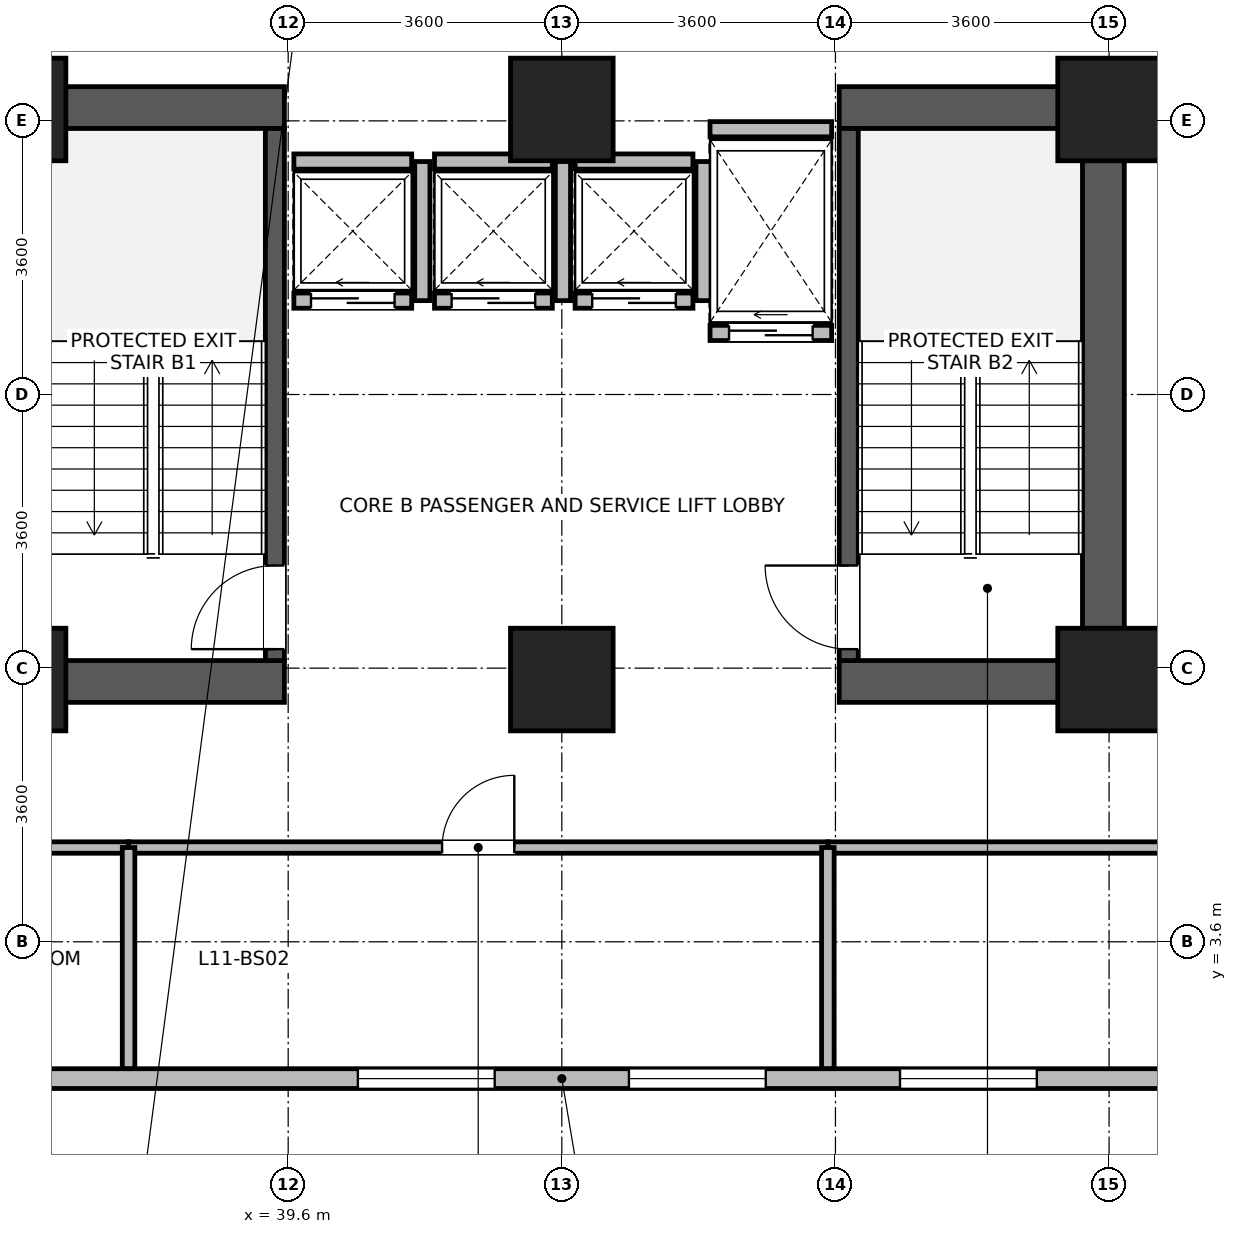
"""IFC4 building model, lengths in metres.
Left out: names, types, materials, properties, quantities, classifications, styles, units other than length and angle.
Written with IfcOpenShell. Run it as: python <this file> out.ifc"""

import sys

from ifc_helpers import new_model, si_unit, direction, frame, frame_2d, origin, origin_2d, place, context, subcontext, project, spatial, rectangle, extrude, source, transform, mapped, element, fill, save


model = new_model("IFC4")
c1 = context("Model", 3, precision=1e-05, world=origin(), true_north=direction((0.0, 1.0)))
c2 = subcontext(c1, "Body", "Model", "MODEL_VIEW")
j1 = project(units=[si_unit("LENGTHUNIT", "METRE"), si_unit("PLANEANGLEUNIT", "RADIAN")], contexts=[c1])
p1 = place(None, origin())
s1 = spatial("IfcSite", under=j1, at=p1, CompositionType="ELEMENT")
p2 = place(p1, origin())
s2 = spatial("IfcBuilding", under=s1, at=p2, CompositionType="ELEMENT")
p3 = place(p2, frame((0.0, 0.0, 47.5)))
s3 = spatial("IfcBuildingStorey", under=s2, at=p3, CompositionType="ELEMENT", Elevation=47.5)
p4 = place(p3, frame((50.325, 6.75, 0.0), z_axis=(0.0, 0.0, 1.0), x_axis=(0.0, 1.0, 0.0)))
e1 = element("IfcWall", 1, at=p4, inside=s3, PredefinedType="SHEAR", context=c2, shape_type="SweptSolid", body=[
    extrude(rectangle(XDim=8.1, YDim=0.55, at=frame_2d((4.05, 0.0))), origin(), (0.0, 0.0, 1.0), 3.45),
])
for number, where, z_axis, x_axis in (
    (2, (36.35, 7.025, 0.0), (0.0, 0.0, 1.0), (1.0, 0.0, 0.0)),
    (3, (46.85, 7.025, 0.0), (0.0, 0.0, 1.0), (1.0, 0.0, 0.0)),
    (4, (36.35, 14.575, 0.0), (0.0, 0.0, 1.0), (1.0, 0.0, 0.0)),
    (5, (46.85, 14.575, 0.0), (0.0, 0.0, 1.0), (1.0, 0.0, 0.0)),
):
    element("IfcWall", number, at=place(p3, frame(where, z_axis=z_axis, x_axis=x_axis)), inside=s3, PredefinedType="SHEAR", context=c2, shape_type="SweptSolid", body=[
        extrude(rectangle(XDim=3.2, YDim=0.55, at=frame_2d((1.6, 0.0))), origin(), (0.0, 0.0, 1.0), 3.45),
    ])
p5 = place(p3, frame((39.425, 7.3, 0.0), z_axis=(0.0, 0.0, 1.0), x_axis=(0.0, 1.0, 0.0)))
e6 = element("IfcWall", 6, at=p5, inside=s3, PredefinedType="SHEAR", context=c2, shape_type="SweptSolid", body=[
    extrude(rectangle(XDim=7.0, YDim=0.25, at=frame_2d((3.5, 0.0))), origin(), (0.0, 0.0, 1.0), 3.45),
])
p6 = place(p5, frame((0.15, 0.0, 0.0)))
e7 = element("IfcOpeningElement", 7, at=p6, cuts=e6, PredefinedType="OPENING", context=c2, shape_type="SweptSolid", body=[
    extrude(rectangle(XDim=1.1, YDim=2.08, at=frame_2d((0.55, 1.04))), frame((0.0, 0.135, 0.0), z_axis=(0.0, -1.0, 0.0), x_axis=(1.0, 0.0, 0.0)), (0.0, 0.0, 1.0), 0.27),
])
p7 = place(p3, frame((46.975, 7.3, 0.0), z_axis=(0.0, 0.0, 1.0), x_axis=(0.0, 1.0, 0.0)))
e8 = element("IfcWall", 8, at=p7, inside=s3, PredefinedType="SHEAR", context=c2, shape_type="SweptSolid", body=[
    extrude(rectangle(XDim=7.0, YDim=0.25, at=frame_2d((3.5, 0.0))), origin(), (0.0, 0.0, 1.0), 3.45),
])
p8 = place(p7, frame((0.15, 0.0, 0.0)))
e9 = element("IfcOpeningElement", 9, at=p8, cuts=e8, PredefinedType="OPENING", context=c2, shape_type="SweptSolid", body=[
    extrude(rectangle(XDim=1.1, YDim=2.08, at=frame_2d((0.55, 1.04))), frame((0.0, 0.135, 0.0), z_axis=(0.0, -1.0, 0.0), x_axis=(1.0, 0.0, 0.0)), (0.0, 0.0, 1.0), 0.27),
])
m1 = source(origin(), c2, "Body", "SweptSolid", [
    extrude(rectangle(XDim=1.35, YDim=1.35, at=origin_2d()), origin(), (0.0, 0.0, 1.0), 3.7),
])
for number, where, z_axis, x_axis in (
    (10, (36.0, 7.05, 0.0), (0.0, 0.0, 1.0), (1.0, 0.0, 0.0)),
    (11, (36.0, 14.55, 0.0), (0.0, 0.0, 1.0), (1.0, 0.0, 0.0)),
    (12, (43.2, 7.05, 0.0), (0.0, 0.0, 1.0), (1.0, 0.0, 0.0)),
    (13, (43.2, 14.55, 0.0), (0.0, 0.0, 1.0), (1.0, 0.0, 0.0)),
    (14, (50.4, 7.05, 0.0), (0.0, 0.0, 1.0), (1.0, 0.0, 0.0)),
    (15, (50.4, 14.55, 0.0), (0.0, 0.0, 1.0), (1.0, 0.0, 0.0)),
):
    element("IfcColumn", number, at=place(p3, frame(where, z_axis=z_axis, x_axis=x_axis)), inside=s3, PredefinedType="COLUMN", context=c2, shape_type="MappedRepresentation", body=[
        mapped(m1, transform((0.0, 0.0, 0.0), x_axis=(1.0, 0.0, 0.0), y_axis=(0.0, 1.0, 0.0), z_axis=(0.0, 0.0, 1.0), scale=1.0)),
    ])
p9 = place(p3, frame((57.465, 1.8, 0.0), z_axis=(0.0, 0.0, 1.0), x_axis=(-1.0, 0.0, 0.0)))
e16 = element("IfcWall", 16, at=p9, inside=s3, PredefinedType="STANDARD", context=c2, shape_type="SweptSolid", body=[
    extrude(rectangle(XDim=28.53, YDim=0.26, at=frame_2d((14.265, 0.0))), origin(), (0.0, 0.0, 1.0), 3.43),
])
p10 = place(p9, frame((0.883, 0.0, 0.85)))
e17 = element("IfcOpeningElement", 17, at=p10, cuts=e16, PredefinedType="OPENING", context=c2, shape_type="SweptSolid", body=[
    extrude(rectangle(XDim=1.8, YDim=1.85, at=frame_2d((0.9, 0.925))), frame((0.0, 0.14, 0.0), z_axis=(0.0, -1.0, 0.0), x_axis=(1.0, 0.0, 0.0)), (0.0, 0.0, 1.0), 0.28),
])
p11 = place(p9, frame((4.449, 0.0, 0.85)))
e18 = element("IfcOpeningElement", 18, at=p11, cuts=e16, PredefinedType="OPENING", context=c2, shape_type="SweptSolid", body=[
    extrude(rectangle(XDim=1.8, YDim=1.85, at=frame_2d((0.9, 0.925))), frame((0.0, 0.14, 0.0), z_axis=(0.0, -1.0, 0.0), x_axis=(1.0, 0.0, 0.0)), (0.0, 0.0, 1.0), 0.28),
])
p12 = place(p9, frame((8.016, 0.0, 0.85)))
e19 = element("IfcOpeningElement", 19, at=p12, cuts=e16, PredefinedType="OPENING", context=c2, shape_type="SweptSolid", body=[
    extrude(rectangle(XDim=1.8, YDim=1.85, at=frame_2d((0.9, 0.925))), frame((0.0, 0.14, 0.0), z_axis=(0.0, -1.0, 0.0), x_axis=(1.0, 0.0, 0.0)), (0.0, 0.0, 1.0), 0.28),
])
p13 = place(p9, frame((11.582, 0.0, 0.85)))
e20 = element("IfcOpeningElement", 20, at=p13, cuts=e16, PredefinedType="OPENING", context=c2, shape_type="SweptSolid", body=[
    extrude(rectangle(XDim=1.8, YDim=1.85, at=frame_2d((0.9, 0.925))), frame((0.0, 0.14, 0.0), z_axis=(0.0, -1.0, 0.0), x_axis=(1.0, 0.0, 0.0)), (0.0, 0.0, 1.0), 0.28),
])
p14 = place(p9, frame((15.148, 0.0, 0.85)))
e21 = element("IfcOpeningElement", 21, at=p14, cuts=e16, PredefinedType="OPENING", context=c2, shape_type="SweptSolid", body=[
    extrude(rectangle(XDim=1.8, YDim=1.85, at=frame_2d((0.9, 0.925))), frame((0.0, 0.14, 0.0), z_axis=(0.0, -1.0, 0.0), x_axis=(1.0, 0.0, 0.0)), (0.0, 0.0, 1.0), 0.28),
])
p15 = place(p9, frame((22.281, 0.0, 0.85)))
e22 = element("IfcOpeningElement", 22, at=p15, cuts=e16, PredefinedType="OPENING", context=c2, shape_type="SweptSolid", body=[
    extrude(rectangle(XDim=1.8, YDim=1.85, at=frame_2d((0.9, 0.925))), frame((0.0, 0.14, 0.0), z_axis=(0.0, -1.0, 0.0), x_axis=(1.0, 0.0, 0.0)), (0.0, 0.0, 1.0), 0.28),
])
p16 = place(p9, frame((25.847, 0.0, 0.85)))
e23 = element("IfcOpeningElement", 23, at=p16, cuts=e16, PredefinedType="OPENING", context=c2, shape_type="SweptSolid", body=[
    extrude(rectangle(XDim=1.8, YDim=1.85, at=frame_2d((0.9, 0.925))), frame((0.0, 0.14, 0.0), z_axis=(0.0, -1.0, 0.0), x_axis=(1.0, 0.0, 0.0)), (0.0, 0.0, 1.0), 0.28),
])
p17 = place(p3, frame((39.675, 12.035, 0.0), z_axis=(0.0, 0.0, 1.0), x_axis=(1.0, 0.0, 0.0)))
e24 = element("IfcWall", 24, at=p17, inside=s3, PredefinedType="PARTITIONING", context=c2, shape_type="SweptSolid", body=[
    extrude(rectangle(XDim=1.55, YDim=0.2, at=frame_2d((0.775, 0.0))), origin(), (0.0, 0.0, 1.0), 3.43),
])
p18 = place(p17, frame((0.225, 0.0, 0.0)))
e25 = element("IfcOpeningElement", 25, at=p18, cuts=e24, PredefinedType="OPENING", context=c2, shape_type="SweptSolid", body=[
    extrude(rectangle(XDim=1.1, YDim=2.12, at=frame_2d((0.55, 1.06))), frame((0.0, 0.11, 0.0), z_axis=(0.0, -1.0, 0.0), x_axis=(1.0, 0.0, 0.0)), (0.0, 0.0, 1.0), 0.22),
])
p19 = place(p3, frame((39.675, 13.865, 0.0), z_axis=(0.0, 0.0, 1.0), x_axis=(1.0, 0.0, 0.0)))
e26 = element("IfcWall", 26, at=p19, inside=s3, PredefinedType="PARTITIONING", context=c2, shape_type="SweptSolid", body=[
    extrude(rectangle(XDim=1.55, YDim=0.2, at=frame_2d((0.775, 0.0))), origin(), (0.0, 0.0, 1.0), 3.43),
])
p20 = place(p3, frame((41.365, 12.035, 0.0), z_axis=(0.0, 0.0, 1.0), x_axis=(0.0, 1.0, 0.0)))
e27 = element("IfcWall", 27, at=p20, inside=s3, PredefinedType="PARTITIONING", context=c2, shape_type="SweptSolid", body=[
    extrude(rectangle(XDim=1.83, YDim=0.2, at=frame_2d((0.915, 0.0))), origin(), (0.0, 0.0, 1.0), 3.43),
])
p21 = place(p3, frame((41.525, 12.035, 0.0), z_axis=(0.0, 0.0, 1.0), x_axis=(1.0, 0.0, 0.0)))
e28 = element("IfcWall", 28, at=p21, inside=s3, PredefinedType="PARTITIONING", context=c2, shape_type="SweptSolid", body=[
    extrude(rectangle(XDim=1.55, YDim=0.2, at=frame_2d((0.775, 0.0))), origin(), (0.0, 0.0, 1.0), 3.43),
])
p22 = place(p21, frame((0.225, 0.0, 0.0)))
e29 = element("IfcOpeningElement", 29, at=p22, cuts=e28, PredefinedType="OPENING", context=c2, shape_type="SweptSolid", body=[
    extrude(rectangle(XDim=1.1, YDim=2.12, at=frame_2d((0.55, 1.06))), frame((0.0, 0.11, 0.0), z_axis=(0.0, -1.0, 0.0), x_axis=(1.0, 0.0, 0.0)), (0.0, 0.0, 1.0), 0.22),
])
p23 = place(p3, frame((41.525, 13.865, 0.0), z_axis=(0.0, 0.0, 1.0), x_axis=(1.0, 0.0, 0.0)))
e30 = element("IfcWall", 30, at=p23, inside=s3, PredefinedType="PARTITIONING", context=c2, shape_type="SweptSolid", body=[
    extrude(rectangle(XDim=1.55, YDim=0.2, at=frame_2d((0.775, 0.0))), origin(), (0.0, 0.0, 1.0), 3.43),
])
p24 = place(p3, frame((43.215, 12.035, 0.0), z_axis=(0.0, 0.0, 1.0), x_axis=(0.0, 1.0, 0.0)))
e31 = element("IfcWall", 31, at=p24, inside=s3, PredefinedType="PARTITIONING", context=c2, shape_type="SweptSolid", body=[
    extrude(rectangle(XDim=1.83, YDim=0.2, at=frame_2d((0.915, 0.0))), origin(), (0.0, 0.0, 1.0), 3.43),
])
p25 = place(p3, frame((43.375, 12.035, 0.0), z_axis=(0.0, 0.0, 1.0), x_axis=(1.0, 0.0, 0.0)))
e32 = element("IfcWall", 32, at=p25, inside=s3, PredefinedType="PARTITIONING", context=c2, shape_type="SweptSolid", body=[
    extrude(rectangle(XDim=1.55, YDim=0.2, at=frame_2d((0.775, 0.0))), origin(), (0.0, 0.0, 1.0), 3.43),
])
p26 = place(p25, frame((0.225, 0.0, 0.0)))
e33 = element("IfcOpeningElement", 33, at=p26, cuts=e32, PredefinedType="OPENING", context=c2, shape_type="SweptSolid", body=[
    extrude(rectangle(XDim=1.1, YDim=2.12, at=frame_2d((0.55, 1.06))), frame((0.0, 0.11, 0.0), z_axis=(0.0, -1.0, 0.0), x_axis=(1.0, 0.0, 0.0)), (0.0, 0.0, 1.0), 0.22),
])
p27 = place(p3, frame((43.375, 13.865, 0.0), z_axis=(0.0, 0.0, 1.0), x_axis=(1.0, 0.0, 0.0)))
e34 = element("IfcWall", 34, at=p27, inside=s3, PredefinedType="PARTITIONING", context=c2, shape_type="SweptSolid", body=[
    extrude(rectangle(XDim=1.55, YDim=0.2, at=frame_2d((0.775, 0.0))), origin(), (0.0, 0.0, 1.0), 3.43),
])
p28 = place(p3, frame((45.065, 12.035, 0.0), z_axis=(0.0, 0.0, 1.0), x_axis=(0.0, 1.0, 0.0)))
e35 = element("IfcWall", 35, at=p28, inside=s3, PredefinedType="PARTITIONING", context=c2, shape_type="SweptSolid", body=[
    extrude(rectangle(XDim=1.83, YDim=0.2, at=frame_2d((0.915, 0.0))), origin(), (0.0, 0.0, 1.0), 3.43),
])
p29 = place(p3, frame((45.15, 11.61, 0.0), z_axis=(0.0, 0.0, 1.0), x_axis=(1.0, 0.0, 0.0)))
e36 = element("IfcWall", 36, at=p29, inside=s3, PredefinedType="PARTITIONING", context=c2, shape_type="SweptSolid", body=[
    extrude(rectangle(XDim=1.6, YDim=0.2, at=frame_2d((0.8, 0.0))), origin(), (0.0, 0.0, 1.0), 3.43),
])
p30 = place(p29, frame((0.25, 0.0, 0.0)))
e37 = element("IfcOpeningElement", 37, at=p30, cuts=e36, PredefinedType="OPENING", context=c2, shape_type="SweptSolid", body=[
    extrude(rectangle(XDim=1.1, YDim=2.12, at=frame_2d((0.55, 1.06))), frame((0.0, 0.11, 0.0), z_axis=(0.0, -1.0, 0.0), x_axis=(1.0, 0.0, 0.0)), (0.0, 0.0, 1.0), 0.22),
])
p31 = place(p3, frame((45.15, 14.29, 0.0), z_axis=(0.0, 0.0, 1.0), x_axis=(1.0, 0.0, 0.0)))
e38 = element("IfcWall", 38, at=p31, inside=s3, PredefinedType="PARTITIONING", context=c2, shape_type="SweptSolid", body=[
    extrude(rectangle(XDim=1.6, YDim=0.2, at=frame_2d((0.8, 0.0))), origin(), (0.0, 0.0, 1.0), 2.23),
])
p32 = place(p3, frame((46.7, 4.84, 0.0), z_axis=(0.0, 0.0, 1.0), x_axis=(1.0, 0.0, 0.0)))
e39 = element("IfcWall", 39, at=p32, inside=s3, PredefinedType="PARTITIONING", context=c2, shape_type="SweptSolid", body=[
    extrude(rectangle(XDim=10.768, YDim=0.15, at=frame_2d((5.384, 0.0))), origin(), (0.0, 0.0, 1.0), 3.43),
])
p33 = place(p32, frame((4.734, 0.0, 0.0)))
e40 = element("IfcOpeningElement", 40, at=p33, cuts=e39, PredefinedType="OPENING", context=c2, shape_type="SweptSolid", body=[
    extrude(rectangle(XDim=1.3, YDim=2.12, at=frame_2d((0.65, 1.06))), frame((0.0, 0.085, 0.0), z_axis=(0.0, -1.0, 0.0), x_axis=(1.0, 0.0, 0.0)), (0.0, 0.0, 1.0), 0.17),
])
p34 = place(p3, frame((37.5, 4.84, 0.0), z_axis=(0.0, 0.0, 1.0), x_axis=(1.0, 0.0, 0.0)))
e41 = element("IfcWall", 41, at=p34, inside=s3, PredefinedType="PARTITIONING", context=c2, shape_type="SweptSolid", body=[
    extrude(rectangle(XDim=9.2, YDim=0.15, at=frame_2d((4.6, 0.0))), origin(), (0.0, 0.0, 1.0), 3.43),
])
p35 = place(p34, frame((4.125, 0.0, 0.0)))
e42 = element("IfcOpeningElement", 42, at=p35, cuts=e41, PredefinedType="OPENING", context=c2, shape_type="SweptSolid", body=[
    extrude(rectangle(XDim=0.95, YDim=2.1, at=frame_2d((0.475, 1.05))), frame((0.0, 0.085, 0.0), z_axis=(0.0, -1.0, 0.0), x_axis=(1.0, 0.0, 0.0)), (0.0, 0.0, 1.0), 0.17),
])
p36 = place(p3, frame((28.932, 4.84, 0.0), z_axis=(0.0, 0.0, 1.0), x_axis=(1.0, 0.0, 0.0)))
e43 = element("IfcWall", 43, at=p36, inside=s3, PredefinedType="PARTITIONING", context=c2, shape_type="SweptSolid", body=[
    extrude(rectangle(XDim=8.568, YDim=0.15, at=frame_2d((4.284, 0.0))), origin(), (0.0, 0.0, 1.0), 3.43),
])
p37 = place(p36, frame((3.809, 0.0, 0.0)))
e44 = element("IfcOpeningElement", 44, at=p37, cuts=e43, PredefinedType="OPENING", context=c2, shape_type="SweptSolid", body=[
    extrude(rectangle(XDim=0.95, YDim=2.1, at=frame_2d((0.475, 1.05))), frame((0.0, 0.085, 0.0), z_axis=(0.0, -1.0, 0.0), x_axis=(1.0, 0.0, 0.0)), (0.0, 0.0, 1.0), 0.17),
])
for number, where, z_axis, x_axis in (
    (45, (37.5, 1.932, 0.0), (0.0, 0.0, 1.0), (0.0, 1.0, 0.0)),
    (46, (46.7, 1.932, 0.0), (0.0, 0.0, 1.0), (0.0, 1.0, 0.0)),
):
    element("IfcWall", number, at=place(p3, frame(where, z_axis=z_axis, x_axis=x_axis)), inside=s3, PredefinedType="PARTITIONING", context=c2, shape_type="SweptSolid", body=[
        extrude(rectangle(XDim=2.908, YDim=0.165, at=frame_2d((1.454, 0.0))), origin(), (0.0, 0.0, 1.0), 3.43),
    ])
p38 = place(p12, origin())
e47 = element("IfcWindow", 47, at=p38, inside=s3, PartitioningType="SINGLE_PANEL", PredefinedType="WINDOW", context=c2, shape_type="SweptSolid", body=[
    extrude(rectangle(XDim=1.8, YDim=1.85, at=frame_2d((0.9, 0.925))), frame((0.0, 0.03, 0.0), z_axis=(0.0, -1.0, 0.0), x_axis=(1.0, 0.0, 0.0)), (0.0, 0.0, 1.0), 0.06),
])
fill(e19, e47)
p39 = place(p13, origin())
e48 = element("IfcWindow", 48, at=p39, inside=s3, PartitioningType="SINGLE_PANEL", PredefinedType="WINDOW", context=c2, shape_type="SweptSolid", body=[
    extrude(rectangle(XDim=1.8, YDim=1.85, at=frame_2d((0.9, 0.925))), frame((0.0, 0.03, 0.0), z_axis=(0.0, -1.0, 0.0), x_axis=(1.0, 0.0, 0.0)), (0.0, 0.0, 1.0), 0.06),
])
fill(e20, e48)
p40 = place(p14, origin())
e49 = element("IfcWindow", 49, at=p40, inside=s3, PartitioningType="SINGLE_PANEL", PredefinedType="WINDOW", context=c2, shape_type="SweptSolid", body=[
    extrude(rectangle(XDim=1.8, YDim=1.85, at=frame_2d((0.9, 0.925))), frame((0.0, 0.03, 0.0), z_axis=(0.0, -1.0, 0.0), x_axis=(1.0, 0.0, 0.0)), (0.0, 0.0, 1.0), 0.06),
])
fill(e21, e49)
p41 = place(p6, origin())
e50 = element("IfcDoor", 50, at=p41, inside=s3, OperationType="SINGLE_SWING_LEFT", PredefinedType="DOOR", context=c2, shape_type="SweptSolid", body=[
    extrude(rectangle(XDim=1.1, YDim=2.08, at=frame_2d((0.55, 1.04))), frame((0.0, 0.025, 0.0), z_axis=(0.0, -1.0, 0.0), x_axis=(1.0, 0.0, 0.0)), (0.0, 0.0, 1.0), 0.05),
])
fill(e7, e50)
p42 = place(p8, origin())
e51 = element("IfcDoor", 51, at=p42, inside=s3, OperationType="SINGLE_SWING_RIGHT", PredefinedType="DOOR", context=c2, shape_type="SweptSolid", body=[
    extrude(rectangle(XDim=1.1, YDim=2.08, at=frame_2d((0.55, 1.04))), frame((0.0, 0.025, 0.0), z_axis=(0.0, -1.0, 0.0), x_axis=(1.0, 0.0, 0.0)), (0.0, 0.0, 1.0), 0.05),
])
fill(e9, e51)
p43 = place(p18, origin())
e52 = element("IfcDoor", 52, at=p43, inside=s3, OperationType="SLIDING_TO_LEFT", PredefinedType="DOOR", context=c2, shape_type="SweptSolid", body=[
    extrude(rectangle(XDim=1.1, YDim=2.12, at=frame_2d((0.55, 1.06))), frame((0.0, 0.025, 0.0), z_axis=(0.0, -1.0, 0.0), x_axis=(1.0, 0.0, 0.0)), (0.0, 0.0, 1.0), 0.05),
])
fill(e25, e52)
p44 = place(p22, origin())
e53 = element("IfcDoor", 53, at=p44, inside=s3, OperationType="SLIDING_TO_LEFT", PredefinedType="DOOR", context=c2, shape_type="SweptSolid", body=[
    extrude(rectangle(XDim=1.1, YDim=2.12, at=frame_2d((0.55, 1.06))), frame((0.0, 0.025, 0.0), z_axis=(0.0, -1.0, 0.0), x_axis=(1.0, 0.0, 0.0)), (0.0, 0.0, 1.0), 0.05),
])
fill(e29, e53)
p45 = place(p26, origin())
e54 = element("IfcDoor", 54, at=p45, inside=s3, OperationType="SLIDING_TO_LEFT", PredefinedType="DOOR", context=c2, shape_type="SweptSolid", body=[
    extrude(rectangle(XDim=1.1, YDim=2.12, at=frame_2d((0.55, 1.06))), frame((0.0, 0.025, 0.0), z_axis=(0.0, -1.0, 0.0), x_axis=(1.0, 0.0, 0.0)), (0.0, 0.0, 1.0), 0.05),
])
fill(e33, e54)
p46 = place(p30, origin())
e55 = element("IfcDoor", 55, at=p46, inside=s3, OperationType="SLIDING_TO_LEFT", PredefinedType="DOOR", context=c2, shape_type="SweptSolid", body=[
    extrude(rectangle(XDim=1.1, YDim=2.12, at=frame_2d((0.55, 1.06))), frame((0.0, 0.025, 0.0), z_axis=(0.0, -1.0, 0.0), x_axis=(1.0, 0.0, 0.0)), (0.0, 0.0, 1.0), 0.05),
])
fill(e37, e55)
p47 = place(p35, origin())
e56 = element("IfcDoor", 56, at=p47, inside=s3, OperationType="SINGLE_SWING_RIGHT", PredefinedType="DOOR", context=c2, shape_type="SweptSolid", body=[
    extrude(rectangle(XDim=0.95, YDim=2.1, at=frame_2d((0.475, 1.05))), frame((0.0, 0.025, 0.0), z_axis=(0.0, -1.0, 0.0), x_axis=(1.0, 0.0, 0.0)), (0.0, 0.0, 1.0), 0.05),
])
fill(e42, e56)
save(model, sys.argv[1])
